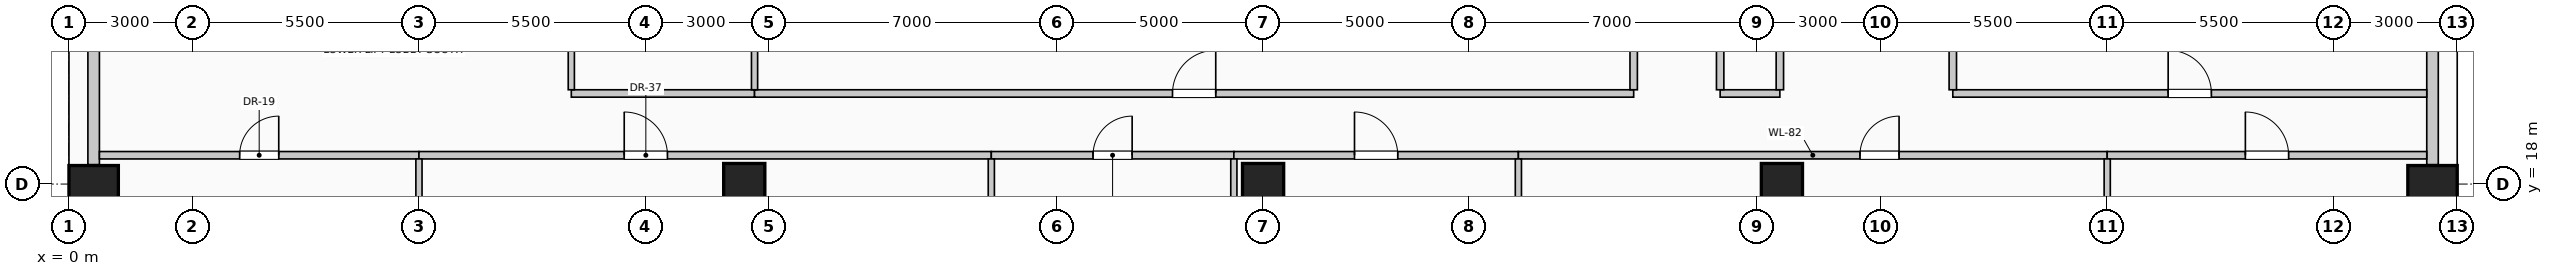
"""IFC4 building model, lengths in metres.
Left out: names, types, materials, properties, quantities, classifications, styles, units other than length and angle.
Written with IfcOpenShell. Run it as: python <this file> out.ifc"""

import sys

from ifc_helpers import new_model, si_unit, direction, frame, frame_2d, origin, origin_2d, place, context, subcontext, project, spatial, rectangle, circle, extrude, element, fill, save


model = new_model("IFC4")
c1 = context("Model", 3, precision=1e-05, world=origin(), true_north=direction((0.0, 1.0)))
c2 = subcontext(c1, "Body", "Model", "MODEL_VIEW")
j1 = project(units=[si_unit("LENGTHUNIT", "METRE"), si_unit("PLANEANGLEUNIT", "RADIAN")], contexts=[c1])
p1 = place(None, origin())
s1 = spatial("IfcSite", under=j1, at=p1, CompositionType="ELEMENT")
p2 = place(p1, origin())
s2 = spatial("IfcBuilding", under=s1, at=p2, CompositionType="ELEMENT")
p3 = place(p2, frame((0.0, 0.0, 66.6)))
s3 = spatial("IfcBuildingStorey", under=s2, at=p3, CompositionType="ELEMENT", Elevation=66.6)
for number, where, z_axis, x_axis in (
    (1, (0.6, 18.0, 0.0), (0.0, 0.0, 1.0), (0.0, 1.0, 0.0)),
    (2, (57.4, 18.0, 0.0), (0.0, 0.0, 1.0), (0.0, 1.0, 0.0)),
):
    element("IfcColumn", number, at=place(p3, frame(where, z_axis=z_axis, x_axis=x_axis)), inside=s3, PredefinedType="COLUMN", context=c2, shape_type="SweptSolid", body=[
        extrude(rectangle(XDim=0.9, YDim=1.2, at=origin_2d()), origin(), (0.0, 0.0, 1.0), 4.0),
    ])
for number, where, z_axis, x_axis in (
    (3, (16.4, 18.0, 0.0), (0.0, 0.0, 1.0), (1.0, 0.0, 0.0)),
    (4, (29.0, 18.0, 0.0), (0.0, 0.0, 1.0), (1.0, 0.0, 0.0)),
    (5, (41.6, 18.0, 0.0), (0.0, 0.0, 1.0), (1.0, 0.0, 0.0)),
):
    element("IfcColumn", number, at=place(p3, frame(where, z_axis=z_axis, x_axis=x_axis)), inside=s3, PredefinedType="COLUMN", context=c2, shape_type="SweptSolid", body=[
        extrude(circle(Radius=0.5, at=origin_2d()), origin(), (0.0, 0.0, 1.0), 4.0),
    ])
for number, where, z_axis, x_axis in (
    (6, (0.6, 18.47, 0.0), (0.0, 0.0, 1.0), (0.0, 1.0, 0.0)),
    (7, (57.4, 25.53, 0.0), (0.0, 0.0, 1.0), (0.0, -1.0, 0.0)),
):
    element("IfcWall", number, at=place(p3, frame(where, z_axis=z_axis, x_axis=x_axis)), inside=s3, PredefinedType="SOLIDWALL", context=c2, shape_type="SweptSolid", body=[
        extrude(rectangle(XDim=7.06, YDim=0.28, at=frame_2d((3.53, 0.0))), origin(), (0.0, 0.0, 1.0), 2.85),
    ])
p4 = place(p3, frame((0.74, 18.7, 0.0), z_axis=(0.0, 0.0, 1.0), x_axis=(1.0, 0.0, 0.0)))
e8 = element("IfcWall", 8, at=p4, inside=s3, PredefinedType="PARTITIONING", context=c2, shape_type="SweptSolid", body=[
    extrude(rectangle(XDim=7.76, YDim=0.18, at=frame_2d((3.88, 0.0))), origin(), (0.0, 0.0, 1.0), 3.7),
])
p5 = place(p4, frame((3.405, 0.0, 0.0)))
e9 = element("IfcOpeningElement", 9, at=p5, cuts=e8, PredefinedType="OPENING", context=c2, shape_type="SweptSolid", body=[
    extrude(rectangle(XDim=0.95, YDim=2.15, at=frame_2d((0.475, 1.075))), frame((0.0, 0.1, 0.0), z_axis=(0.0, -1.0, 0.0), x_axis=(1.0, 0.0, 0.0)), (0.0, 0.0, 1.0), 0.2),
])
p6 = place(p3, frame((8.5, 18.7, 0.0), z_axis=(0.0, 0.0, 1.0), x_axis=(1.0, 0.0, 0.0)))
e10 = element("IfcWall", 10, at=p6, inside=s3, PredefinedType="PARTITIONING", context=c2, shape_type="SweptSolid", body=[
    extrude(rectangle(XDim=13.9, YDim=0.18, at=frame_2d((6.95, 0.0))), origin(), (0.0, 0.0, 1.0), 3.7),
])
p7 = place(p6, frame((4.985, 0.0, 0.0)))
e11 = element("IfcOpeningElement", 11, at=p7, cuts=e10, PredefinedType="OPENING", context=c2, shape_type="SweptSolid", body=[
    extrude(rectangle(XDim=1.05, YDim=2.15, at=frame_2d((0.525, 1.075))), frame((0.0, 0.1, 0.0), z_axis=(0.0, -1.0, 0.0), x_axis=(1.0, 0.0, 0.0)), (0.0, 0.0, 1.0), 0.2),
])
p8 = place(p3, frame((22.4, 18.7, 0.0), z_axis=(0.0, 0.0, 1.0), x_axis=(1.0, 0.0, 0.0)))
e12 = element("IfcWall", 12, at=p8, inside=s3, PredefinedType="PARTITIONING", context=c2, shape_type="SweptSolid", body=[
    extrude(rectangle(XDim=5.89, YDim=0.18, at=frame_2d((2.945, 0.0))), origin(), (0.0, 0.0, 1.0), 3.7),
])
p9 = place(p8, frame((2.47, 0.0, 0.0)))
e13 = element("IfcOpeningElement", 13, at=p9, cuts=e12, PredefinedType="OPENING", context=c2, shape_type="SweptSolid", body=[
    extrude(rectangle(XDim=0.95, YDim=2.15, at=frame_2d((0.475, 1.075))), frame((0.0, 0.1, 0.0), z_axis=(0.0, -1.0, 0.0), x_axis=(1.0, 0.0, 0.0)), (0.0, 0.0, 1.0), 0.2),
])
p10 = place(p3, frame((28.29, 18.7, 0.0), z_axis=(0.0, 0.0, 1.0), x_axis=(1.0, 0.0, 0.0)))
e14 = element("IfcWall", 14, at=p10, inside=s3, PredefinedType="PARTITIONING", context=c2, shape_type="SweptSolid", body=[
    extrude(rectangle(XDim=6.91, YDim=0.18, at=frame_2d((3.455, 0.0))), origin(), (0.0, 0.0, 1.0), 3.7),
])
p11 = place(p10, frame((2.93, 0.0, 0.0)))
e15 = element("IfcOpeningElement", 15, at=p11, cuts=e14, PredefinedType="OPENING", context=c2, shape_type="SweptSolid", body=[
    extrude(rectangle(XDim=1.05, YDim=2.15, at=frame_2d((0.525, 1.075))), frame((0.0, 0.1, 0.0), z_axis=(0.0, -1.0, 0.0), x_axis=(1.0, 0.0, 0.0)), (0.0, 0.0, 1.0), 0.2),
])
p12 = place(p3, frame((35.2, 18.7, 0.0), z_axis=(0.0, 0.0, 1.0), x_axis=(1.0, 0.0, 0.0)))
e16 = element("IfcWall", 16, at=p12, inside=s3, PredefinedType="PARTITIONING", context=c2, shape_type="SweptSolid", body=[
    extrude(rectangle(XDim=14.3, YDim=0.18, at=frame_2d((7.15, 0.0))), origin(), (0.0, 0.0, 1.0), 3.7),
])
p13 = place(p12, frame((8.295, 0.0, 0.0)))
e17 = element("IfcOpeningElement", 17, at=p13, cuts=e16, PredefinedType="OPENING", context=c2, shape_type="SweptSolid", body=[
    extrude(rectangle(XDim=0.95, YDim=2.15, at=frame_2d((0.475, 1.075))), frame((0.0, 0.1, 0.0), z_axis=(0.0, -1.0, 0.0), x_axis=(1.0, 0.0, 0.0)), (0.0, 0.0, 1.0), 0.2),
])
p14 = place(p3, frame((49.5, 18.7, 0.0), z_axis=(0.0, 0.0, 1.0), x_axis=(1.0, 0.0, 0.0)))
e18 = element("IfcWall", 18, at=p14, inside=s3, PredefinedType="PARTITIONING", context=c2, shape_type="SweptSolid", body=[
    extrude(rectangle(XDim=7.76, YDim=0.18, at=frame_2d((3.88, 0.0))), origin(), (0.0, 0.0, 1.0), 3.7),
])
p15 = place(p14, frame((3.355, 0.0, 0.0)))
e19 = element("IfcOpeningElement", 19, at=p15, cuts=e18, PredefinedType="OPENING", context=c2, shape_type="SweptSolid", body=[
    extrude(rectangle(XDim=1.05, YDim=2.15, at=frame_2d((0.525, 1.075))), frame((0.0, 0.1, 0.0), z_axis=(0.0, -1.0, 0.0), x_axis=(1.0, 0.0, 0.0)), (0.0, 0.0, 1.0), 0.2),
])
p16 = place(p3, frame((12.2, 20.2, 0.0), z_axis=(0.0, 0.0, 1.0), x_axis=(1.0, 0.0, 0.0)))
e20 = element("IfcWall", 20, at=p16, inside=s3, PredefinedType="PARTITIONING", context=c2, shape_type="SweptSolid", body=[
    extrude(rectangle(XDim=4.45, YDim=0.18, at=frame_2d((2.225, 0.0))), origin(), (0.0, 0.0, 1.0), 3.7),
])
p17 = place(p3, frame((16.65, 20.2, 0.0), z_axis=(0.0, 0.0, 1.0), x_axis=(1.0, 0.0, 0.0)))
e21 = element("IfcWall", 21, at=p17, inside=s3, PredefinedType="PARTITIONING", context=c2, shape_type="SweptSolid", body=[
    extrude(rectangle(XDim=21.35, YDim=0.18, at=frame_2d((10.675, 0.0))), origin(), (0.0, 0.0, 1.0), 3.7),
])
p18 = place(p17, frame((10.15, 0.0, 0.0)))
e22 = element("IfcOpeningElement", 22, at=p18, cuts=e21, PredefinedType="OPENING", context=c2, shape_type="SweptSolid", body=[
    extrude(rectangle(XDim=1.05, YDim=2.15, at=frame_2d((0.525, 1.075))), frame((0.0, 0.1, 0.0), z_axis=(0.0, -1.0, 0.0), x_axis=(1.0, 0.0, 0.0)), (0.0, 0.0, 1.0), 0.2),
])
p19 = place(p3, frame((40.1, 20.2, 0.0), z_axis=(0.0, 0.0, 1.0), x_axis=(1.0, 0.0, 0.0)))
e23 = element("IfcWall", 23, at=p19, inside=s3, PredefinedType="PARTITIONING", context=c2, shape_type="SweptSolid", body=[
    extrude(rectangle(XDim=1.45, YDim=0.18, at=frame_2d((0.725, 0.0))), origin(), (0.0, 0.0, 1.0), 3.7),
])
p20 = place(p3, frame((45.75, 20.2, 0.0), z_axis=(0.0, 0.0, 1.0), x_axis=(1.0, 0.0, 0.0)))
e24 = element("IfcWall", 24, at=p20, inside=s3, PredefinedType="PARTITIONING", context=c2, shape_type="SweptSolid", body=[
    extrude(rectangle(XDim=11.51, YDim=0.18, at=frame_2d((5.755, 0.0))), origin(), (0.0, 0.0, 1.0), 3.7),
])
p21 = place(p20, frame((5.23, 0.0, 0.0)))
e25 = element("IfcOpeningElement", 25, at=p21, cuts=e24, PredefinedType="OPENING", context=c2, shape_type="SweptSolid", body=[
    extrude(rectangle(XDim=1.05, YDim=2.15, at=frame_2d((0.525, 1.075))), frame((0.0, 0.1, 0.0), z_axis=(0.0, -1.0, 0.0), x_axis=(1.0, 0.0, 0.0)), (0.0, 0.0, 1.0), 0.2),
])
p22 = place(p3, frame((8.5, 1.2, 0.0), z_axis=(0.0, 0.0, 1.0), x_axis=(0.0, 1.0, 0.0)))
e26 = element("IfcWall", 26, at=p22, inside=s3, PredefinedType="PARTITIONING", context=c2, shape_type="SweptSolid", body=[
    extrude(rectangle(XDim=17.41, YDim=0.15, at=frame_2d((8.705, 0.0))), origin(), (0.0, 0.0, 1.0), 3.7),
])
p23 = place(p3, frame((12.2, 20.29, 0.0), z_axis=(0.0, 0.0, 1.0), x_axis=(0.0, 1.0, 0.0)))
e27 = element("IfcWall", 27, at=p23, inside=s3, PredefinedType="PARTITIONING", context=c2, shape_type="SweptSolid", body=[
    extrude(rectangle(XDim=1.81, YDim=0.15, at=frame_2d((0.905, 0.0))), origin(), (0.0, 0.0, 1.0), 3.7),
])
p24 = place(p3, frame((16.65, 20.29, 0.0), z_axis=(0.0, 0.0, 1.0), x_axis=(0.0, 1.0, 0.0)))
e28 = element("IfcWall", 28, at=p24, inside=s3, PredefinedType="PARTITIONING", context=c2, shape_type="SweptSolid", body=[
    extrude(rectangle(XDim=7.835, YDim=0.15, at=frame_2d((3.917, 0.0))), origin(), (0.0, 0.0, 1.0), 2.995),
])
for number, where, z_axis, x_axis in (
    (29, (22.4, 0.74, 0.0), (0.0, 0.0, 1.0), (0.0, 1.0, 0.0)),
    (30, (28.29, 0.74, 0.0), (0.0, 0.0, 1.0), (0.0, 1.0, 0.0)),
    (31, (35.2, 0.74, 0.0), (0.0, 0.0, 1.0), (0.0, 1.0, 0.0)),
):
    element("IfcWall", number, at=place(p3, frame(where, z_axis=z_axis, x_axis=x_axis)), inside=s3, PredefinedType="PARTITIONING", context=c2, shape_type="SweptSolid", body=[
        extrude(rectangle(XDim=17.87, YDim=0.15, at=frame_2d((8.935, 0.0))), origin(), (0.0, 0.0, 1.0), 3.7),
    ])
p25 = place(p3, frame((38.0, 20.29, 0.0), z_axis=(0.0, 0.0, 1.0), x_axis=(0.0, 1.0, 0.0)))
e32 = element("IfcWall", 32, at=p25, inside=s3, PredefinedType="PARTITIONING", context=c2, shape_type="SweptSolid", body=[
    extrude(rectangle(XDim=7.835, YDim=0.18, at=frame_2d((3.917, 0.0))), origin(), (0.0, 0.0, 1.0), 3.7),
])
p26 = place(p3, frame((40.1, 20.29, 0.0), z_axis=(0.0, 0.0, 1.0), x_axis=(0.0, 1.0, 0.0)))
e33 = element("IfcWall", 33, at=p26, inside=s3, PredefinedType="PARTITIONING", context=c2, shape_type="SweptSolid", body=[
    extrude(rectangle(XDim=9.82, YDim=0.18, at=frame_2d((4.91, 0.0))), origin(), (0.0, 0.0, 1.0), 3.7),
])
p27 = place(p3, frame((41.55, 20.29, 0.0), z_axis=(0.0, 0.0, 1.0), x_axis=(0.0, 1.0, 0.0)))
e34 = element("IfcWall", 34, at=p27, inside=s3, PredefinedType="PARTITIONING", context=c2, shape_type="SweptSolid", body=[
    extrude(rectangle(XDim=9.835, YDim=0.18, at=frame_2d((4.917, 0.0))), origin(), (0.0, 0.0, 1.0), 2.995),
])
p28 = place(p3, frame((45.75, 20.29, 0.0), z_axis=(0.0, 0.0, 1.0), x_axis=(0.0, 1.0, 0.0)))
e35 = element("IfcWall", 35, at=p28, inside=s3, PredefinedType="PARTITIONING", context=c2, shape_type="SweptSolid", body=[
    extrude(rectangle(XDim=11.985, YDim=0.18, at=frame_2d((5.992, 0.0))), origin(), (0.0, 0.0, 1.0), 3.7),
])
p29 = place(p3, frame((49.5, 1.2, 0.0), z_axis=(0.0, 0.0, 1.0), x_axis=(0.0, 1.0, 0.0)))
e36 = element("IfcWall", 36, at=p29, inside=s3, PredefinedType="PARTITIONING", context=c2, shape_type="SweptSolid", body=[
    extrude(rectangle(XDim=17.41, YDim=0.15, at=frame_2d((8.705, 0.0))), origin(), (0.0, 0.0, 1.0), 3.7),
])
p30 = place(p5, origin())
e37 = element("IfcDoor", 37, at=p30, inside=s3, OperationType="SINGLE_SWING_RIGHT", PredefinedType="DOOR", context=c2, shape_type="SweptSolid", body=[
    extrude(rectangle(XDim=0.95, YDim=2.15, at=frame_2d((0.475, 1.075))), frame((0.0, 0.025, 0.0), z_axis=(0.0, -1.0, 0.0), x_axis=(1.0, 0.0, 0.0)), (0.0, 0.0, 1.0), 0.05),
])
fill(e9, e37)
p31 = place(p7, origin())
e38 = element("IfcDoor", 38, at=p31, inside=s3, OperationType="SINGLE_SWING_LEFT", PredefinedType="DOOR", context=c2, shape_type="SweptSolid", body=[
    extrude(rectangle(XDim=1.05, YDim=2.15, at=frame_2d((0.525, 1.075))), frame((0.0, 0.025, 0.0), z_axis=(0.0, -1.0, 0.0), x_axis=(1.0, 0.0, 0.0)), (0.0, 0.0, 1.0), 0.05),
])
fill(e11, e38)
p32 = place(p9, origin())
e39 = element("IfcDoor", 39, at=p32, inside=s3, OperationType="SINGLE_SWING_RIGHT", PredefinedType="DOOR", context=c2, shape_type="SweptSolid", body=[
    extrude(rectangle(XDim=0.95, YDim=2.15, at=frame_2d((0.475, 1.075))), frame((0.0, 0.025, 0.0), z_axis=(0.0, -1.0, 0.0), x_axis=(1.0, 0.0, 0.0)), (0.0, 0.0, 1.0), 0.05),
])
fill(e13, e39)
p33 = place(p11, origin())
e40 = element("IfcDoor", 40, at=p33, inside=s3, OperationType="SINGLE_SWING_LEFT", PredefinedType="DOOR", context=c2, shape_type="SweptSolid", body=[
    extrude(rectangle(XDim=1.05, YDim=2.15, at=frame_2d((0.525, 1.075))), frame((0.0, 0.025, 0.0), z_axis=(0.0, -1.0, 0.0), x_axis=(1.0, 0.0, 0.0)), (0.0, 0.0, 1.0), 0.05),
])
fill(e15, e40)
p34 = place(p13, origin())
e41 = element("IfcDoor", 41, at=p34, inside=s3, OperationType="SINGLE_SWING_RIGHT", PredefinedType="DOOR", context=c2, shape_type="SweptSolid", body=[
    extrude(rectangle(XDim=0.95, YDim=2.15, at=frame_2d((0.475, 1.075))), frame((0.0, 0.025, 0.0), z_axis=(0.0, -1.0, 0.0), x_axis=(1.0, 0.0, 0.0)), (0.0, 0.0, 1.0), 0.05),
])
fill(e17, e41)
p35 = place(p15, origin())
e42 = element("IfcDoor", 42, at=p35, inside=s3, OperationType="SINGLE_SWING_LEFT", PredefinedType="DOOR", context=c2, shape_type="SweptSolid", body=[
    extrude(rectangle(XDim=1.05, YDim=2.15, at=frame_2d((0.525, 1.075))), frame((0.0, 0.025, 0.0), z_axis=(0.0, -1.0, 0.0), x_axis=(1.0, 0.0, 0.0)), (0.0, 0.0, 1.0), 0.05),
])
fill(e19, e42)
p36 = place(p18, origin())
e43 = element("IfcDoor", 43, at=p36, inside=s3, OperationType="SINGLE_SWING_RIGHT", PredefinedType="DOOR", context=c2, shape_type="SweptSolid", body=[
    extrude(rectangle(XDim=1.05, YDim=2.15, at=frame_2d((0.525, 1.075))), frame((0.0, 0.025, 0.0), z_axis=(0.0, -1.0, 0.0), x_axis=(1.0, 0.0, 0.0)), (0.0, 0.0, 1.0), 0.05),
])
fill(e22, e43)
p37 = place(p21, origin())
e44 = element("IfcDoor", 44, at=p37, inside=s3, OperationType="SINGLE_SWING_LEFT", PredefinedType="DOOR", context=c2, shape_type="SweptSolid", body=[
    extrude(rectangle(XDim=1.05, YDim=2.15, at=frame_2d((0.525, 1.075))), frame((0.0, 0.025, 0.0), z_axis=(0.0, -1.0, 0.0), x_axis=(1.0, 0.0, 0.0)), (0.0, 0.0, 1.0), 0.05),
])
fill(e25, e44)
save(model, sys.argv[1])
